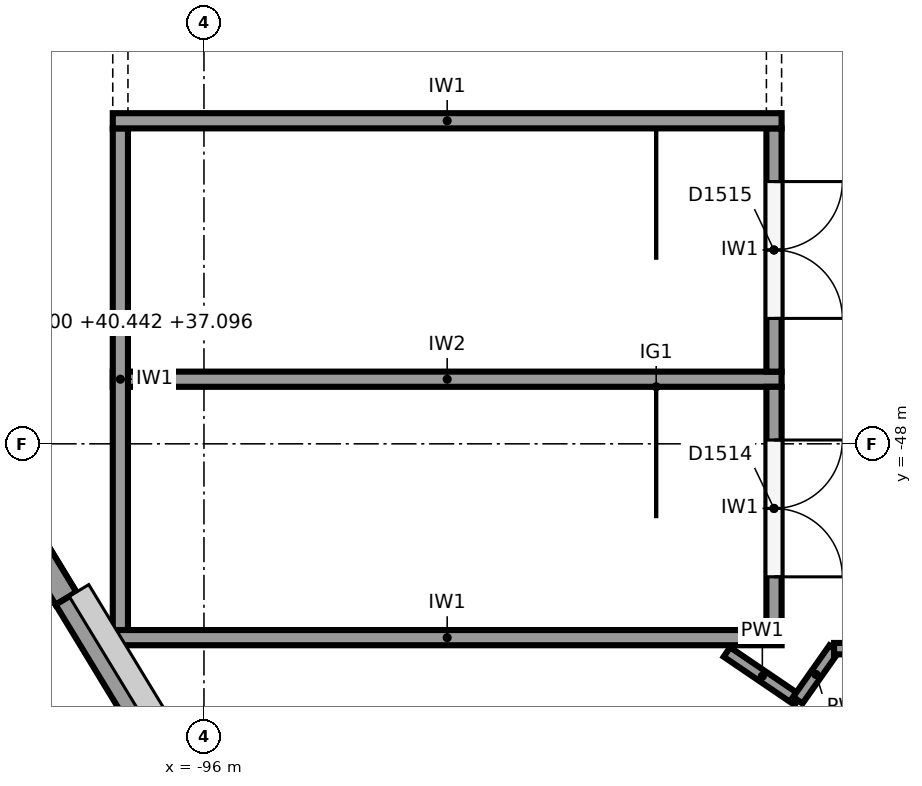
"""IFC4 building model, lengths in metres.
Left out: names, types, materials, properties, quantities, classifications, styles, units other than length and angle.
Written with IfcOpenShell. Run it as: python <this file> out.ifc"""

import sys

from ifc_helpers import new_model, si_unit, direction, frame, frame_2d, origin, place, context, subcontext, project, spatial, polyline, rectangle, outline, extrude, element, fill, save


model = new_model("IFC4")
c1 = context("Model", 3, precision=1e-05, world=origin(), true_north=direction((0.0, 1.0)))
c2 = subcontext(c1, "Body", "Model", "MODEL_VIEW")
j1 = project(units=[si_unit("LENGTHUNIT", "METRE"), si_unit("PLANEANGLEUNIT", "RADIAN")], contexts=[c1])
p1 = place(None, origin())
s1 = spatial("IfcSite", under=j1, at=p1, CompositionType="ELEMENT")
p2 = place(p1, origin())
s2 = spatial("IfcBuilding", under=s1, at=p2, CompositionType="ELEMENT")
p3 = place(p2, frame((0.0, 0.0, 24.0)))
s3 = spatial("IfcBuildingStorey", under=s2, at=p3, CompositionType="ELEMENT", Elevation=24.0)
p4 = place(p3, frame((-101.161, -43.311, 0.0), z_axis=(0.0, 0.0, 1.0), x_axis=(0.477867771117, 0.878431780691, 0.0)))
e1 = element("IfcWall", 1, at=p4, inside=s3, PredefinedType="SOLIDWALL", context=c2, shape_type="SweptSolid", body=[
    extrude(rectangle(XDim=13.28, YDim=0.32, at=frame_2d((6.64, 0.0))), origin(), (0.0, 0.0, 1.0), 6.0),
])
p5 = place(p4, frame((11.63, 0.0, 1.0)))
e2 = element("IfcOpeningElement", 2, at=p5, cuts=e1, PredefinedType="OPENING", context=c2, shape_type="SweptSolid", body=[
    extrude(rectangle(XDim=0.9, YDim=3.25, at=frame_2d((0.45, 1.625))), frame((0.0, 0.17, 0.0), z_axis=(0.0, -1.0, 0.0), x_axis=(1.0, 0.0, 0.0)), (0.0, 0.0, 1.0), 0.34),
])
p6 = place(p4, frame((9.53, 0.0, 1.0)))
e3 = element("IfcOpeningElement", 3, at=p6, cuts=e1, PredefinedType="OPENING", context=c2, shape_type="SweptSolid", body=[
    extrude(rectangle(XDim=0.9, YDim=3.25, at=frame_2d((0.45, 1.625))), frame((0.0, 0.17, 0.0), z_axis=(0.0, -1.0, 0.0), x_axis=(1.0, 0.0, 0.0)), (0.0, 0.0, 1.0), 0.34),
])
p7 = place(p4, frame((1.13, 0.0, 1.0)))
e4 = element("IfcOpeningElement", 4, at=p7, cuts=e1, PredefinedType="OPENING", context=c2, shape_type="SweptSolid", body=[
    extrude(rectangle(XDim=0.9, YDim=3.25, at=frame_2d((0.45, 1.625))), frame((0.0, 0.17, 0.0), z_axis=(0.0, -1.0, 0.0), x_axis=(1.0, 0.0, 0.0)), (0.0, 0.0, 1.0), 0.34),
])
p8 = place(p3, frame((-101.337, -43.215, 6.0), z_axis=(0.0, 0.0, 1.0), x_axis=(0.477867771117, 0.878431780691, 0.0)))
e5 = element("IfcWall", 5, at=p8, inside=s3, PredefinedType="SOLIDWALL", context=c2, shape_type="SweptSolid", body=[
    extrude(outline(polyline([(0.0, 0.0), (13.28, 0.0), (13.28, 4.105), (0.0, 10.451), (0.0, 0.0)])), frame((0.0, 0.16, 0.0), z_axis=(0.0, -1.0, 0.0), x_axis=(1.0, 0.0, 0.0)), (0.0, 0.0, 1.0), 0.32),
])
p9 = place(p8, frame((9.53, 0.0, 1.6)))
e6 = element("IfcOpeningElement", 6, at=p9, cuts=e5, PredefinedType="OPENING", context=c2, shape_type="SweptSolid", body=[
    extrude(rectangle(XDim=0.9, YDim=3.0, at=frame_2d((0.45, 1.5))), frame((0.0, 0.17, 0.0), z_axis=(0.0, -1.0, 0.0), x_axis=(1.0, 0.0, 0.0)), (0.0, 0.0, 1.0), 0.34),
])
p10 = place(p8, frame((1.13, 0.0, 1.6)))
e7 = element("IfcOpeningElement", 7, at=p10, cuts=e5, PredefinedType="OPENING", context=c2, shape_type="SweptSolid", body=[
    extrude(rectangle(XDim=0.9, YDim=3.0, at=frame_2d((0.45, 1.5))), frame((0.0, 0.17, 0.0), z_axis=(0.0, -1.0, 0.0), x_axis=(1.0, 0.0, 0.0)), (0.0, 0.0, 1.0), 0.34),
])
p11 = place(p3, frame((-97.815, -50.034, 0.0), z_axis=(0.0, 0.0, 1.0), x_axis=(-0.519367009964, 0.854551291007, 0.0)))
e8 = element("IfcWall", 8, at=p11, inside=s3, PredefinedType="SOLIDWALL", context=c2, shape_type="SweptSolid", body=[
    extrude(rectangle(XDim=6.732, YDim=0.32, at=frame_2d((3.366, 0.0))), origin(), (0.0, 0.0, 1.0), 6.0),
])
p12 = place(p11, frame((5.25, 0.0, 1.0)))
e9 = element("IfcOpeningElement", 9, at=p12, cuts=e8, PredefinedType="OPENING", context=c2, shape_type="SweptSolid", body=[
    extrude(rectangle(XDim=0.9, YDim=3.25, at=frame_2d((0.45, 1.625))), frame((0.0, 0.17, 0.0), z_axis=(0.0, -1.0, 0.0), x_axis=(1.0, 0.0, 0.0)), (0.0, 0.0, 1.0), 0.34),
])
p13 = place(p3, frame((-97.815, -50.034, 6.0), z_axis=(0.0, 0.0, 1.0), x_axis=(-0.519367009964, 0.854551291007, 0.0)))
e10 = element("IfcWall", 10, at=p13, inside=s3, PredefinedType="SOLIDWALL", context=c2, shape_type="SweptSolid", body=[
    extrude(outline(polyline([(0.0, 0.0), (6.732, 0.0), (6.732, 10.442), (0.0, 7.095), (0.0, 0.0)])), frame((0.0, 0.16, 0.0), z_axis=(0.0, -1.0, 0.0), x_axis=(1.0, 0.0, 0.0)), (0.0, 0.0, 1.0), 0.32),
])
p14 = place(p13, frame((5.25, 0.0, 1.6)))
e11 = element("IfcOpeningElement", 11, at=p14, cuts=e10, PredefinedType="OPENING", context=c2, shape_type="SweptSolid", body=[
    extrude(rectangle(XDim=0.9, YDim=3.0, at=frame_2d((0.45, 1.5))), frame((0.0, 0.17, 0.0), z_axis=(0.0, -1.0, 0.0), x_axis=(1.0, 0.0, 0.0)), (0.0, 0.0, 1.0), 0.34),
])
p15 = place(p3, frame((-94.699, -55.161, 5.65), z_axis=(0.0, 0.0, 1.0), x_axis=(-0.519376262918, 0.85454566731, 0.0)))
e12 = element("IfcWall", 12, at=p15, inside=s3, PredefinedType="SOLIDWALL", context=c2, shape_type="SweptSolid", body=[
    extrude(outline(polyline([(0.0, 0.0), (6.0, 0.0), (6.0, 7.446), (0.0, 4.463), (0.0, 0.0)])), frame((0.0, 0.16, 0.0), z_axis=(0.0, -1.0, 0.0), x_axis=(1.0, 0.0, 0.0)), (0.0, 0.0, 1.0), 0.32),
])
for number, where, z_axis, x_axis in (
    (13, (-97.2, -43.75, 0.0), (0.0, 0.0, 1.0), (1.0, 0.0, 0.0)),
    (14, (-97.2, -50.55, 0.0), (0.0, 0.0, 1.0), (1.0, 0.0, 0.0)),
):
    element("IfcWall", number, at=place(p3, frame(where, z_axis=z_axis, x_axis=x_axis)), inside=s3, PredefinedType="SHEAR", context=c2, shape_type="SweptSolid", body=[
        extrude(rectangle(XDim=8.8, YDim=0.2, at=frame_2d((4.4, 0.0))), origin(), (0.0, 0.0, 1.0), 5.75),
    ])
for number, where, z_axis, x_axis in (
    (15, (-97.1, -37.05, 0.0), (0.0, 0.0, 1.0), (0.0, -1.0, 0.0)),
    (16, (-97.1, -43.85, 0.0), (0.0, 0.0, 1.0), (0.0, -1.0, 0.0)),
):
    element("IfcWall", number, at=place(p3, frame(where, z_axis=z_axis, x_axis=x_axis)), inside=s3, PredefinedType="SHEAR", context=c2, shape_type="SweptSolid", body=[
        extrude(rectangle(XDim=6.6, YDim=0.2, at=frame_2d((3.3, 0.0))), origin(), (0.0, 0.0, 1.0), 5.75),
    ])
p16 = place(p3, frame((-97.2, -47.15, 0.0), z_axis=(0.0, 0.0, 1.0), x_axis=(1.0, 0.0, 0.0)))
e17 = element("IfcWall", 17, at=p16, inside=s3, PredefinedType="SHEAR", context=c2, shape_type="SweptSolid", body=[
    extrude(rectangle(XDim=8.8, YDim=0.2, at=frame_2d((4.4, 0.0))), origin(), (0.0, 0.0, 1.0), 5.75),
])
p17 = place(p3, frame((-88.5, -40.45, 0.0), z_axis=(0.0, 0.0, 1.0), x_axis=(0.0, -1.0, 0.0)))
e18 = element("IfcWall", 18, at=p17, inside=s3, PredefinedType="SHEAR", context=c2, shape_type="SweptSolid", body=[
    extrude(rectangle(XDim=3.2, YDim=0.2, at=frame_2d((1.6, 0.0))), origin(), (0.0, 0.0, 1.0), 5.75),
])
p18 = place(p17, frame((0.7, 0.0, 0.0)))
e19 = element("IfcOpeningElement", 19, at=p18, cuts=e18, PredefinedType="OPENING", context=c2, shape_type="SweptSolid", body=[
    extrude(rectangle(XDim=1.8, YDim=2.1, at=frame_2d((0.9, 1.05))), frame((0.0, 0.11, 0.0), z_axis=(0.0, -1.0, 0.0), x_axis=(1.0, 0.0, 0.0)), (0.0, 0.0, 1.0), 0.22),
])
p19 = place(p3, frame((-88.5, -43.85, 0.0), z_axis=(0.0, 0.0, 1.0), x_axis=(0.0, -1.0, 0.0)))
e20 = element("IfcWall", 20, at=p19, inside=s3, PredefinedType="SHEAR", context=c2, shape_type="SweptSolid", body=[
    extrude(rectangle(XDim=3.2, YDim=0.2, at=frame_2d((1.6, 0.0))), origin(), (0.0, 0.0, 1.0), 5.75),
])
p20 = place(p19, frame((0.7, 0.0, 0.0)))
e21 = element("IfcOpeningElement", 21, at=p20, cuts=e20, PredefinedType="OPENING", context=c2, shape_type="SweptSolid", body=[
    extrude(rectangle(XDim=1.8, YDim=2.1, at=frame_2d((0.9, 1.05))), frame((0.0, 0.11, 0.0), z_axis=(0.0, -1.0, 0.0), x_axis=(1.0, 0.0, 0.0)), (0.0, 0.0, 1.0), 0.22),
])
p21 = place(p3, frame((-88.5, -47.25, 0.0), z_axis=(0.0, 0.0, 1.0), x_axis=(0.0, -1.0, 0.0)))
e22 = element("IfcWall", 22, at=p21, inside=s3, PredefinedType="SHEAR", context=c2, shape_type="SweptSolid", body=[
    extrude(rectangle(XDim=3.2, YDim=0.2, at=frame_2d((1.6, 0.0))), origin(), (0.0, 0.0, 1.0), 5.75),
])
p22 = place(p21, frame((0.7, 0.0, 0.0)))
e23 = element("IfcOpeningElement", 23, at=p22, cuts=e22, PredefinedType="OPENING", context=c2, shape_type="SweptSolid", body=[
    extrude(rectangle(XDim=1.8, YDim=2.1, at=frame_2d((0.9, 1.05))), frame((0.0, 0.11, 0.0), z_axis=(0.0, -1.0, 0.0), x_axis=(1.0, 0.0, 0.0)), (0.0, 0.0, 1.0), 0.22),
])
p23 = place(p3, frame((-89.12, -50.74, 0.0), z_axis=(0.0, 0.0, 1.0), x_axis=(0.827055308354, -0.562120553728, 0.0)))
e24 = element("IfcWall", 24, at=p23, inside=s3, PredefinedType="PARTITIONING", context=c2, shape_type="SweptSolid", body=[
    extrude(rectangle(XDim=1.128, YDim=0.15, at=frame_2d((0.564, 0.0))), origin(), (0.0, 0.0, 1.0), 5.4),
])
p24 = place(p3, frame((-88.187, -51.374, 0.0), z_axis=(0.0, 0.0, 1.0), x_axis=(0.575376756214, 0.817888493872, 0.0)))
e25 = element("IfcWall", 25, at=p24, inside=s3, PredefinedType="PARTITIONING", context=c2, shape_type="SweptSolid", body=[
    extrude(rectangle(XDim=0.83, YDim=0.15, at=frame_2d((0.415, 0.0))), origin(), (0.0, 0.0, 1.0), 5.4),
])
p25 = place(p3, frame((-87.709, -50.695, 0.0), z_axis=(0.0, 0.0, 1.0), x_axis=(1.0, 0.0, 0.0)))
e26 = element("IfcWall", 26, at=p25, inside=s3, PredefinedType="PARTITIONING", context=c2, shape_type="SweptSolid", body=[
    extrude(rectangle(XDim=3.704, YDim=0.15, at=frame_2d((1.852, 0.0))), origin(), (0.0, 0.0, 1.0), 5.4),
])
p26 = place(p25, frame((0.65, 0.0, 0.0)))
e27 = element("IfcOpeningElement", 27, at=p26, cuts=e26, PredefinedType="OPENING", context=c2, shape_type="SweptSolid", body=[
    extrude(rectangle(XDim=1.8, YDim=2.1, at=frame_2d((0.9, 1.05))), frame((0.0, 0.085, 0.0), z_axis=(0.0, -1.0, 0.0), x_axis=(1.0, 0.0, 0.0)), (0.0, 0.0, 1.0), 0.17),
])
p27 = place(p18, origin())
e28 = element("IfcDoor", 28, at=p27, inside=s3, OperationType="DOUBLE_DOOR_SINGLE_SWING", PredefinedType="DOOR", context=c2, shape_type="SweptSolid", body=[
    extrude(rectangle(XDim=1.8, YDim=2.1, at=frame_2d((0.9, 1.05))), frame((0.0, 0.025, 0.0), z_axis=(0.0, -1.0, 0.0), x_axis=(1.0, 0.0, 0.0)), (0.0, 0.0, 1.0), 0.05),
])
fill(e19, e28)
p28 = place(p20, origin())
e29 = element("IfcDoor", 29, at=p28, inside=s3, OperationType="DOUBLE_DOOR_SINGLE_SWING", PredefinedType="DOOR", context=c2, shape_type="SweptSolid", body=[
    extrude(rectangle(XDim=1.8, YDim=2.1, at=frame_2d((0.9, 1.05))), frame((0.0, 0.025, 0.0), z_axis=(0.0, -1.0, 0.0), x_axis=(1.0, 0.0, 0.0)), (0.0, 0.0, 1.0), 0.05),
])
fill(e21, e29)
p29 = place(p22, origin())
e30 = element("IfcDoor", 30, at=p29, inside=s3, OperationType="DOUBLE_DOOR_SINGLE_SWING", PredefinedType="DOOR", context=c2, shape_type="SweptSolid", body=[
    extrude(rectangle(XDim=1.8, YDim=2.1, at=frame_2d((0.9, 1.05))), frame((0.0, 0.025, 0.0), z_axis=(0.0, -1.0, 0.0), x_axis=(1.0, 0.0, 0.0)), (0.0, 0.0, 1.0), 0.05),
])
fill(e23, e30)
save(model, sys.argv[1])
